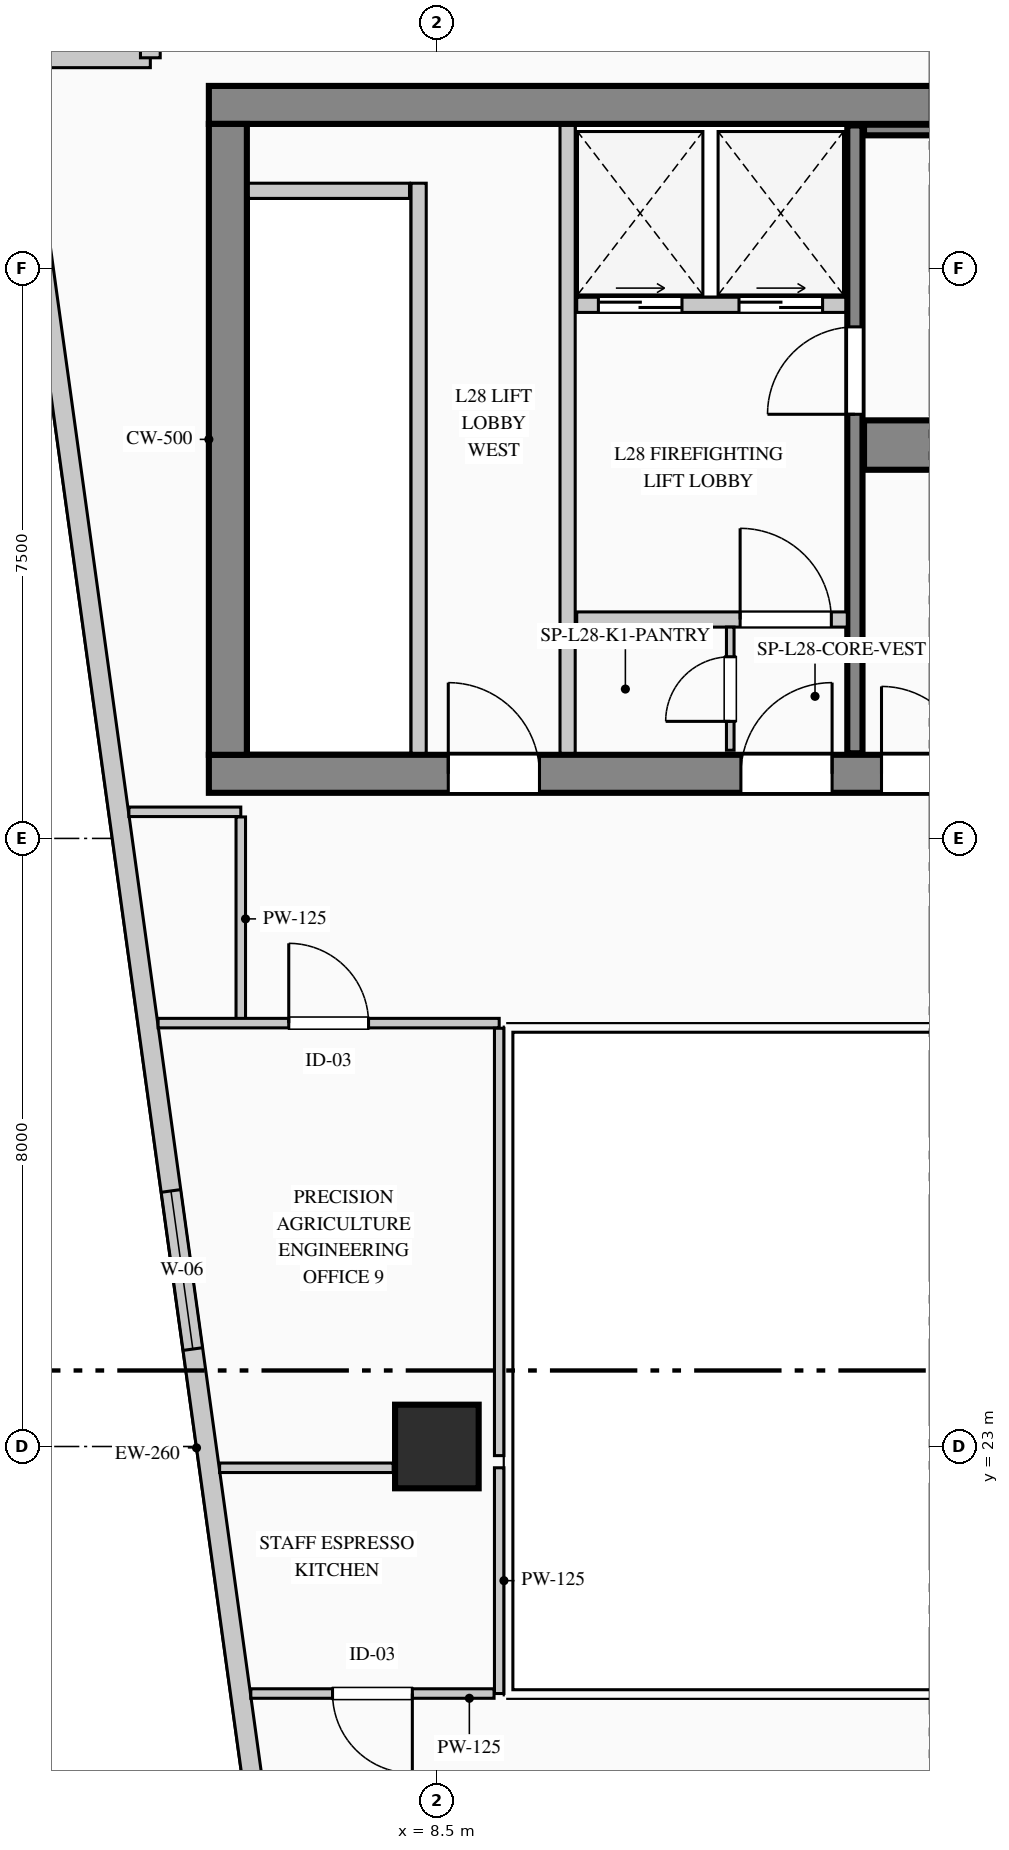
"""IFC4 building model, lengths in metres.
Left out: names, types, materials, properties, quantities, classifications, styles, units other than length and angle.
Written with IfcOpenShell. Run it as: python <this file> out.ifc"""

import sys

from ifc_helpers import new_model, si_unit, direction, frame, frame_2d, origin, origin_2d, place, context, subcontext, project, spatial, rectangle, extrude, element, fill, save


model = new_model("IFC4")
c1 = context("Model", 3, precision=1e-05, world=origin(), true_north=direction((0.0, 1.0)))
c2 = subcontext(c1, "Body", "Model", "MODEL_VIEW")
j1 = project(units=[si_unit("LENGTHUNIT", "METRE"), si_unit("PLANEANGLEUNIT", "RADIAN")], contexts=[c1])
p1 = place(None, origin())
s1 = spatial("IfcSite", under=j1, at=p1, CompositionType="ELEMENT")
p2 = place(p1, origin())
s2 = spatial("IfcBuilding", under=s1, at=p2, CompositionType="ELEMENT")
p3 = place(p2, frame((0.0, 0.0, 123.25)))
s3 = spatial("IfcBuildingStorey", under=s2, at=p3, CompositionType="ELEMENT", Elevation=123.25)
p4 = place(p3, frame((5.5, 40.65, 0.0), z_axis=(0.0, 0.0, 1.0), x_axis=(1.0, 0.0, 0.0)))
e1 = element("IfcWall", 1, at=p4, inside=s3, PredefinedType="SHEAR", context=c2, shape_type="SweptSolid", body=[
    extrude(rectangle(XDim=17.85, YDim=0.5, at=frame_2d((8.925, 0.0))), origin(), (0.0, 0.0, 1.0), 3.95),
])
p5 = place(p4, frame((15.945, 0.0, 0.0)))
e2 = element("IfcOpeningElement", 2, at=p5, cuts=e1, PredefinedType="OPENING", context=c2, shape_type="SweptSolid", body=[
    extrude(rectangle(XDim=1.18, YDim=2.25, at=frame_2d((0.59, 1.125))), frame((0.0, 0.26, 0.0), z_axis=(0.0, -1.0, 0.0), x_axis=(1.0, 0.0, 0.0)), (0.0, 0.0, 1.0), 0.52),
])
p6 = place(p3, frame((5.5, 31.85, 0.0), z_axis=(0.0, 0.0, 1.0), x_axis=(1.0, 0.0, 0.0)))
e3 = element("IfcWall", 3, at=p6, inside=s3, PredefinedType="SHEAR", context=c2, shape_type="SweptSolid", body=[
    extrude(rectangle(XDim=17.85, YDim=0.5, at=frame_2d((8.925, 0.0))), origin(), (0.0, 0.0, 1.0), 3.95),
])
p7 = place(p6, frame((3.15, 0.0, 0.0)))
e4 = element("IfcOpeningElement", 4, at=p7, cuts=e3, PredefinedType="OPENING", context=c2, shape_type="SweptSolid", body=[
    extrude(rectangle(XDim=1.2, YDim=2.2, at=frame_2d((0.6, 1.1))), frame((0.0, 0.26, 0.0), z_axis=(0.0, -1.0, 0.0), x_axis=(1.0, 0.0, 0.0)), (0.0, 0.0, 1.0), 0.52),
])
p8 = place(p6, frame((7.0, 0.0, 0.0)))
e5 = element("IfcOpeningElement", 5, at=p8, cuts=e3, PredefinedType="OPENING", context=c2, shape_type="SweptSolid", body=[
    extrude(rectangle(XDim=1.2, YDim=2.2, at=frame_2d((0.6, 1.1))), frame((0.0, 0.26, 0.0), z_axis=(0.0, -1.0, 0.0), x_axis=(1.0, 0.0, 0.0)), (0.0, 0.0, 1.0), 0.52),
])
p9 = place(p6, frame((8.85, 0.0, 0.0)))
e6 = element("IfcOpeningElement", 6, at=p9, cuts=e3, PredefinedType="OPENING", context=c2, shape_type="SweptSolid", body=[
    extrude(rectangle(XDim=1.15, YDim=2.2, at=frame_2d((0.575, 1.1))), frame((0.0, 0.26, 0.0), z_axis=(0.0, -1.0, 0.0), x_axis=(1.0, 0.0, 0.0)), (0.0, 0.0, 1.0), 0.52),
])
p10 = place(p6, frame((15.95, 0.0, 0.0)))
e7 = element("IfcOpeningElement", 7, at=p10, cuts=e3, PredefinedType="OPENING", context=c2, shape_type="SweptSolid", body=[
    extrude(rectangle(XDim=1.2, YDim=2.2, at=frame_2d((0.6, 1.1))), frame((0.0, 0.26, 0.0), z_axis=(0.0, -1.0, 0.0), x_axis=(1.0, 0.0, 0.0)), (0.0, 0.0, 1.0), 0.52),
])
p11 = place(p3, frame((5.75, 32.1, 0.0), z_axis=(0.0, 0.0, 1.0), x_axis=(0.0, 1.0, 0.0)))
e8 = element("IfcWall", 8, at=p11, inside=s3, PredefinedType="SHEAR", context=c2, shape_type="SweptSolid", body=[
    extrude(rectangle(XDim=8.3, YDim=0.5, at=frame_2d((4.15, 0.0))), origin(), (0.0, 0.0, 1.0), 3.95),
])
p12 = place(p3, frame((14.0, 32.12, 0.0), z_axis=(0.0, 0.0, 1.0), x_axis=(0.0, 1.0, 0.0)))
e9 = element("IfcWall", 9, at=p12, inside=s3, PredefinedType="SHEAR", context=c2, shape_type="SweptSolid", body=[
    extrude(rectangle(XDim=8.26, YDim=0.2, at=frame_2d((4.13, 0.0))), origin(), (0.0, 0.0, 1.0), 3.95),
])
p13 = place(p12, frame((4.46, 0.0, 0.0)))
e10 = element("IfcOpeningElement", 10, at=p13, cuts=e9, PredefinedType="OPENING", context=c2, shape_type="SweptSolid", body=[
    extrude(rectangle(XDim=1.15, YDim=2.2, at=frame_2d((0.575, 1.1))), frame((0.0, 0.11, 0.0), z_axis=(0.0, -1.0, 0.0), x_axis=(1.0, 0.0, 0.0)), (0.0, 0.0, 1.0), 0.22),
])
p14 = place(p3, frame((14.12, 36.175, 0.0), z_axis=(0.0, 0.0, 1.0), x_axis=(1.0, 0.0, 0.0)))
e11 = element("IfcWall", 11, at=p14, inside=s3, PredefinedType="SHEAR", context=c2, shape_type="SweptSolid", body=[
    extrude(rectangle(XDim=7.01, YDim=0.65, at=frame_2d((3.505, 0.0))), origin(), (0.0, 0.0, 1.0), 3.95),
])
p15 = place(p3, frame((14.12, 40.32, 0.0), z_axis=(0.0, 0.0, 1.0), x_axis=(1.0, 0.0, 0.0)))
e12 = element("IfcWall", 12, at=p15, inside=s3, PredefinedType="SHEAR", context=c2, shape_type="SweptSolid", body=[
    extrude(rectangle(XDim=7.01, YDim=0.14, at=frame_2d((3.505, 0.0))), origin(), (0.0, 0.0, 1.0), 3.95),
])
p16 = place(p3, frame((8.5, 23.0, 0.0), z_axis=(0.0, 0.0, 1.0), x_axis=(1.0, 0.0, 0.0)))
e13 = element("IfcColumn", 13, at=p16, inside=s3, PredefinedType="COLUMN", context=c2, shape_type="SweptSolid", body=[
    extrude(rectangle(XDim=1.1, YDim=1.1, at=origin_2d()), origin(), (0.0, 0.0, 1.0), 3.95),
])
p17 = place(p3, frame((7.993, 4.73, 0.0), z_axis=(0.0, 0.0, 1.0), x_axis=(-0.136989009016, 0.990572567462, 0.0)))
e14 = element("IfcWall", 14, at=p17, inside=s3, PredefinedType="STANDARD", context=c2, shape_type="SweptSolid", body=[
    extrude(rectangle(XDim=36.888, YDim=0.26, at=frame_2d((18.444, 0.0))), origin(), (0.0, 0.0, 1.0), 3.69),
])
p18 = place(p17, frame((19.738, 0.0, 0.9)))
e15 = element("IfcOpeningElement", 15, at=p18, cuts=e14, PredefinedType="OPENING", context=c2, shape_type="SweptSolid", body=[
    extrude(rectangle(XDim=2.1, YDim=2.0, at=frame_2d((1.05, 1.0))), frame((0.0, 0.14, 0.0), z_axis=(0.0, -1.0, 0.0), x_axis=(1.0, 0.0, 0.0)), (0.0, 0.0, 1.0), 0.28),
])
p19 = place(p3, frame((2.94, 41.27, 0.0), z_axis=(0.0, 0.0, 1.0), x_axis=(1.0, 0.0, 0.0)))
e16 = element("IfcWall", 16, at=p19, inside=s3, PredefinedType="STANDARD", context=c2, shape_type="SweptSolid", body=[
    extrude(rectangle(XDim=1.79, YDim=0.26, at=frame_2d((0.895, 0.0))), origin(), (0.0, 0.0, 1.0), 3.69),
])
p20 = place(p3, frame((4.73, 41.27, 0.0), z_axis=(0.0, 0.0, 1.0), x_axis=(0.0, 1.0, 0.0)))
e17 = element("IfcWall", 17, at=p20, inside=s3, PredefinedType="STANDARD", context=c2, shape_type="SweptSolid", body=[
    extrude(rectangle(XDim=2.1, YDim=0.26, at=frame_2d((1.05, 0.0))), origin(), (0.0, 0.0, 1.0), 3.69),
])
p21 = place(p3, frame((8.26, 32.12, 0.0), z_axis=(0.0, 0.0, 1.0), x_axis=(0.0, 1.0, 0.0)))
e18 = element("IfcWall", 18, at=p21, inside=s3, PredefinedType="PARTITIONING", context=c2, shape_type="SweptSolid", body=[
    extrude(rectangle(XDim=7.5, YDim=0.2, at=frame_2d((3.75, 0.0))), origin(), (0.0, 0.0, 1.0), 3.69),
])
p22 = place(p3, frame((6.02, 39.52, 0.0), z_axis=(0.0, 0.0, 1.0), x_axis=(1.0, 0.0, 0.0)))
e19 = element("IfcWall", 19, at=p22, inside=s3, PredefinedType="PARTITIONING", context=c2, shape_type="SweptSolid", body=[
    extrude(rectangle(XDim=2.12, YDim=0.2, at=frame_2d((1.06, 0.0))), origin(), (0.0, 0.0, 1.0), 3.69),
])
p23 = place(p3, frame((10.22, 32.12, 0.0), z_axis=(0.0, 0.0, 1.0), x_axis=(0.0, 1.0, 0.0)))
e20 = element("IfcWall", 20, at=p23, inside=s3, PredefinedType="PARTITIONING", context=c2, shape_type="SweptSolid", body=[
    extrude(rectangle(XDim=8.26, YDim=0.2, at=frame_2d((4.13, 0.0))), origin(), (0.0, 0.0, 1.0), 3.69),
])
p24 = place(p3, frame((10.34, 38.02, 0.0), z_axis=(0.0, 0.0, 1.0), x_axis=(1.0, 0.0, 0.0)))
e21 = element("IfcWall", 21, at=p24, inside=s3, PredefinedType="PARTITIONING", context=c2, shape_type="SweptSolid", body=[
    extrude(rectangle(XDim=3.54, YDim=0.2, at=frame_2d((1.77, 0.0))), origin(), (0.0, 0.0, 1.0), 3.69),
])
p25 = place(p24, frame((0.285, 0.0, 0.0)))
e22 = element("IfcOpeningElement", 22, at=p25, cuts=e21, PredefinedType="OPENING", context=c2, shape_type="SweptSolid", body=[
    extrude(rectangle(XDim=1.1, YDim=2.2, at=frame_2d((0.55, 1.1))), frame((0.0, 0.11, 0.0), z_axis=(0.0, -1.0, 0.0), x_axis=(1.0, 0.0, 0.0)), (0.0, 0.0, 1.0), 0.22),
])
p26 = place(p24, frame((2.135, 0.0, 0.0)))
e23 = element("IfcOpeningElement", 23, at=p26, cuts=e21, PredefinedType="OPENING", context=c2, shape_type="SweptSolid", body=[
    extrude(rectangle(XDim=1.1, YDim=2.2, at=frame_2d((0.55, 1.1))), frame((0.0, 0.11, 0.0), z_axis=(0.0, -1.0, 0.0), x_axis=(1.0, 0.0, 0.0)), (0.0, 0.0, 1.0), 0.22),
])
p27 = place(p3, frame((10.34, 33.88, 0.0), z_axis=(0.0, 0.0, 1.0), x_axis=(1.0, 0.0, 0.0)))
e24 = element("IfcWall", 24, at=p27, inside=s3, PredefinedType="PARTITIONING", context=c2, shape_type="SweptSolid", body=[
    extrude(rectangle(XDim=3.56, YDim=0.2, at=frame_2d((1.78, 0.0))), origin(), (0.0, 0.0, 1.0), 3.69),
])
p28 = place(p27, frame((2.15, 0.0, 0.0)))
e25 = element("IfcOpeningElement", 25, at=p28, cuts=e24, PredefinedType="OPENING", context=c2, shape_type="SweptSolid", body=[
    extrude(rectangle(XDim=1.2, YDim=2.2, at=frame_2d((0.6, 1.1))), frame((0.0, 0.11, 0.0), z_axis=(0.0, -1.0, 0.0), x_axis=(1.0, 0.0, 0.0)), (0.0, 0.0, 1.0), 0.22),
])
p29 = place(p3, frame((12.36, 32.16, 0.0), z_axis=(0.0, 0.0, 1.0), x_axis=(0.0, 1.0, 0.0)))
e26 = element("IfcWall", 26, at=p29, inside=s3, PredefinedType="PARTITIONING", context=c2, shape_type="SweptSolid", body=[
    extrude(rectangle(XDim=1.62, YDim=0.1, at=frame_2d((0.81, 0.0))), origin(), (0.0, 0.0, 1.0), 3.69),
])
p30 = place(p29, frame((0.38, 0.0, 0.0)))
e27 = element("IfcOpeningElement", 27, at=p30, cuts=e26, PredefinedType="OPENING", context=c2, shape_type="SweptSolid", body=[
    extrude(rectangle(XDim=0.85, YDim=2.1, at=frame_2d((0.425, 1.05))), frame((0.0, 0.06, 0.0), z_axis=(0.0, -1.0, 0.0), x_axis=(1.0, 0.0, 0.0)), (0.0, 0.0, 1.0), 0.12),
])
p31 = place(p3, frame((9.32, 22.72, 0.0), z_axis=(0.0, 0.0, 1.0), x_axis=(0.0, -1.0, 0.0)))
e28 = element("IfcWall", 28, at=p31, inside=s3, PredefinedType="PARTITIONING", context=c2, shape_type="SweptSolid", body=[
    extrude(rectangle(XDim=2.97, YDim=0.125, at=frame_2d((1.485, 0.0))), origin(), (0.0, 0.0, 1.0), 3.375),
])
p32 = place(p3, frame((9.252, 19.75, 0.0), z_axis=(0.0, 0.0, 1.0), x_axis=(-1.0, 0.0, 0.0)))
e29 = element("IfcWall", 29, at=p32, inside=s3, PredefinedType="PARTITIONING", context=c2, shape_type="SweptSolid", body=[
    extrude(rectangle(XDim=3.2, YDim=0.125, at=frame_2d((1.6, 0.0))), origin(), (0.0, 0.0, 1.0), 3.69),
])
p33 = place(p32, frame((1.075, 0.0, 0.0)))
e30 = element("IfcOpeningElement", 30, at=p33, cuts=e29, PredefinedType="OPENING", context=c2, shape_type="SweptSolid", body=[
    extrude(rectangle(XDim=1.05, YDim=2.15, at=frame_2d((0.525, 1.075))), frame((0.0, 0.073, 0.0), z_axis=(0.0, -1.0, 0.0), x_axis=(1.0, 0.0, 0.0)), (0.0, 0.0, 1.0), 0.145),
])
p34 = place(p3, frame((5.641, 22.72, 0.0), z_axis=(0.0, 0.0, 1.0), x_axis=(1.0, 0.0, 0.0)))
e31 = element("IfcWall", 31, at=p34, inside=s3, PredefinedType="PARTITIONING", context=c2, shape_type="SweptSolid", body=[
    extrude(rectangle(XDim=2.284, YDim=0.125, at=frame_2d((1.142, 0.0))), origin(), (0.0, 0.0, 1.0), 3.69),
])
p35 = place(p3, frame((4.448, 31.35, 0.0), z_axis=(0.0, 0.0, 1.0), x_axis=(1.0, 0.0, 0.0)))
e32 = element("IfcWall", 32, at=p35, inside=s3, PredefinedType="PARTITIONING", context=c2, shape_type="SweptSolid", body=[
    extrude(rectangle(XDim=1.472, YDim=0.125, at=frame_2d((0.736, 0.0))), origin(), (0.0, 0.0, 1.0), 3.69),
])
p36 = place(p3, frame((5.92, 31.282, 0.0), z_axis=(0.0, 0.0, 1.0), x_axis=(0.0, -1.0, 0.0)))
e33 = element("IfcWall", 33, at=p36, inside=s3, PredefinedType="PARTITIONING", context=c2, shape_type="SweptSolid", body=[
    extrude(rectangle(XDim=2.682, YDim=0.125, at=frame_2d((1.341, 0.0))), origin(), (0.0, 0.0, 1.0), 3.69),
])
p37 = place(p3, frame((4.832, 28.57, 0.0), z_axis=(0.0, 0.0, 1.0), x_axis=(1.0, 0.0, 0.0)))
e34 = element("IfcWall", 34, at=p37, inside=s3, PredefinedType="PARTITIONING", context=c2, shape_type="SweptSolid", body=[
    extrude(rectangle(XDim=4.488, YDim=0.125, at=frame_2d((2.244, 0.0))), origin(), (0.0, 0.0, 1.0), 3.69),
])
p38 = place(p37, frame((1.719, 0.0, 0.0)))
e35 = element("IfcOpeningElement", 35, at=p38, cuts=e34, PredefinedType="OPENING", context=c2, shape_type="SweptSolid", body=[
    extrude(rectangle(XDim=1.05, YDim=2.15, at=frame_2d((0.525, 1.075))), frame((0.0, 0.073, 0.0), z_axis=(0.0, -1.0, 0.0), x_axis=(1.0, 0.0, 0.0)), (0.0, 0.0, 1.0), 0.145),
])
p39 = place(p3, frame((9.32, 28.502, 0.0), z_axis=(0.0, 0.0, 1.0), x_axis=(0.0, -1.0, 0.0)))
e36 = element("IfcWall", 36, at=p39, inside=s3, PredefinedType="PARTITIONING", context=c2, shape_type="SweptSolid", body=[
    extrude(rectangle(XDim=5.623, YDim=0.125, at=frame_2d((2.811, 0.0))), origin(), (0.0, 0.0, 1.0), 3.375),
])
p40 = place(p18, origin())
e37 = element("IfcWindow", 37, at=p40, inside=s3, PartitioningType="DOUBLE_PANEL_VERTICAL", PredefinedType="WINDOW", context=c2, shape_type="SweptSolid", body=[
    extrude(rectangle(XDim=2.1, YDim=2.0, at=frame_2d((1.05, 1.0))), frame((0.0, 0.03, 0.0), z_axis=(0.0, -1.0, 0.0), x_axis=(1.0, 0.0, 0.0)), (0.0, 0.0, 1.0), 0.06),
])
fill(e15, e37)
p41 = place(p7, origin())
e38 = element("IfcDoor", 38, at=p41, inside=s3, OperationType="SINGLE_SWING_LEFT", PredefinedType="DOOR", context=c2, shape_type="SweptSolid", body=[
    extrude(rectangle(XDim=1.2, YDim=2.2, at=frame_2d((0.6, 1.1))), frame((0.0, 0.025, 0.0), z_axis=(0.0, -1.0, 0.0), x_axis=(1.0, 0.0, 0.0)), (0.0, 0.0, 1.0), 0.05),
])
fill(e4, e38)
p42 = place(p8, origin())
e39 = element("IfcDoor", 39, at=p42, inside=s3, OperationType="SINGLE_SWING_RIGHT", PredefinedType="DOOR", context=c2, shape_type="SweptSolid", body=[
    extrude(rectangle(XDim=1.2, YDim=2.2, at=frame_2d((0.6, 1.1))), frame((0.0, 0.025, 0.0), z_axis=(0.0, -1.0, 0.0), x_axis=(1.0, 0.0, 0.0)), (0.0, 0.0, 1.0), 0.05),
])
fill(e5, e39)
p43 = place(p9, origin())
e40 = element("IfcDoor", 40, at=p43, inside=s3, OperationType="SINGLE_SWING_LEFT", PredefinedType="DOOR", context=c2, shape_type="SweptSolid", body=[
    extrude(rectangle(XDim=1.15, YDim=2.2, at=frame_2d((0.575, 1.1))), frame((0.0, 0.025, 0.0), z_axis=(0.0, -1.0, 0.0), x_axis=(1.0, 0.0, 0.0)), (0.0, 0.0, 1.0), 0.05),
])
fill(e6, e40)
p44 = place(p28, origin())
e41 = element("IfcDoor", 41, at=p44, inside=s3, OperationType="SINGLE_SWING_LEFT", PredefinedType="DOOR", context=c2, shape_type="SweptSolid", body=[
    extrude(rectangle(XDim=1.2, YDim=2.2, at=frame_2d((0.6, 1.1))), frame((0.0, 0.025, 0.0), z_axis=(0.0, -1.0, 0.0), x_axis=(1.0, 0.0, 0.0)), (0.0, 0.0, 1.0), 0.05),
])
fill(e25, e41)
p45 = place(p30, origin())
e42 = element("IfcDoor", 42, at=p45, inside=s3, OperationType="SINGLE_SWING_LEFT", PredefinedType="DOOR", context=c2, shape_type="SweptSolid", body=[
    extrude(rectangle(XDim=0.85, YDim=2.1, at=frame_2d((0.425, 1.05))), frame((0.0, 0.025, 0.0), z_axis=(0.0, -1.0, 0.0), x_axis=(1.0, 0.0, 0.0)), (0.0, 0.0, 1.0), 0.05),
])
fill(e27, e42)
p46 = place(p13, origin())
e43 = element("IfcDoor", 43, at=p46, inside=s3, OperationType="SINGLE_SWING_LEFT", PredefinedType="DOOR", context=c2, shape_type="SweptSolid", body=[
    extrude(rectangle(XDim=1.15, YDim=2.2, at=frame_2d((0.575, 1.1))), frame((0.0, 0.025, 0.0), z_axis=(0.0, -1.0, 0.0), x_axis=(1.0, 0.0, 0.0)), (0.0, 0.0, 1.0), 0.05),
])
fill(e10, e43)
p47 = place(p25, origin())
e44 = element("IfcDoor", 44, at=p47, inside=s3, OperationType="DOUBLE_DOOR_SLIDING", PredefinedType="DOOR", context=c2, shape_type="SweptSolid", body=[
    extrude(rectangle(XDim=1.1, YDim=2.2, at=frame_2d((0.55, 1.1))), frame((0.0, 0.025, 0.0), z_axis=(0.0, -1.0, 0.0), x_axis=(1.0, 0.0, 0.0)), (0.0, 0.0, 1.0), 0.05),
])
fill(e22, e44)
p48 = place(p26, origin())
e45 = element("IfcDoor", 45, at=p48, inside=s3, OperationType="DOUBLE_DOOR_SLIDING", PredefinedType="DOOR", context=c2, shape_type="SweptSolid", body=[
    extrude(rectangle(XDim=1.1, YDim=2.2, at=frame_2d((0.55, 1.1))), frame((0.0, 0.025, 0.0), z_axis=(0.0, -1.0, 0.0), x_axis=(1.0, 0.0, 0.0)), (0.0, 0.0, 1.0), 0.05),
])
fill(e23, e45)
p49 = place(p33, origin())
e46 = element("IfcDoor", 46, at=p49, inside=s3, OperationType="SINGLE_SWING_LEFT", PredefinedType="DOOR", context=c2, shape_type="SweptSolid", body=[
    extrude(rectangle(XDim=1.05, YDim=2.15, at=frame_2d((0.525, 1.075))), frame((0.0, 0.025, 0.0), z_axis=(0.0, -1.0, 0.0), x_axis=(1.0, 0.0, 0.0)), (0.0, 0.0, 1.0), 0.05),
])
fill(e30, e46)
p50 = place(p38, origin())
e47 = element("IfcDoor", 47, at=p50, inside=s3, OperationType="SINGLE_SWING_LEFT", PredefinedType="DOOR", context=c2, shape_type="SweptSolid", body=[
    extrude(rectangle(XDim=1.05, YDim=2.15, at=frame_2d((0.525, 1.075))), frame((0.0, 0.025, 0.0), z_axis=(0.0, -1.0, 0.0), x_axis=(1.0, 0.0, 0.0)), (0.0, 0.0, 1.0), 0.05),
])
fill(e35, e47)
save(model, sys.argv[1])
